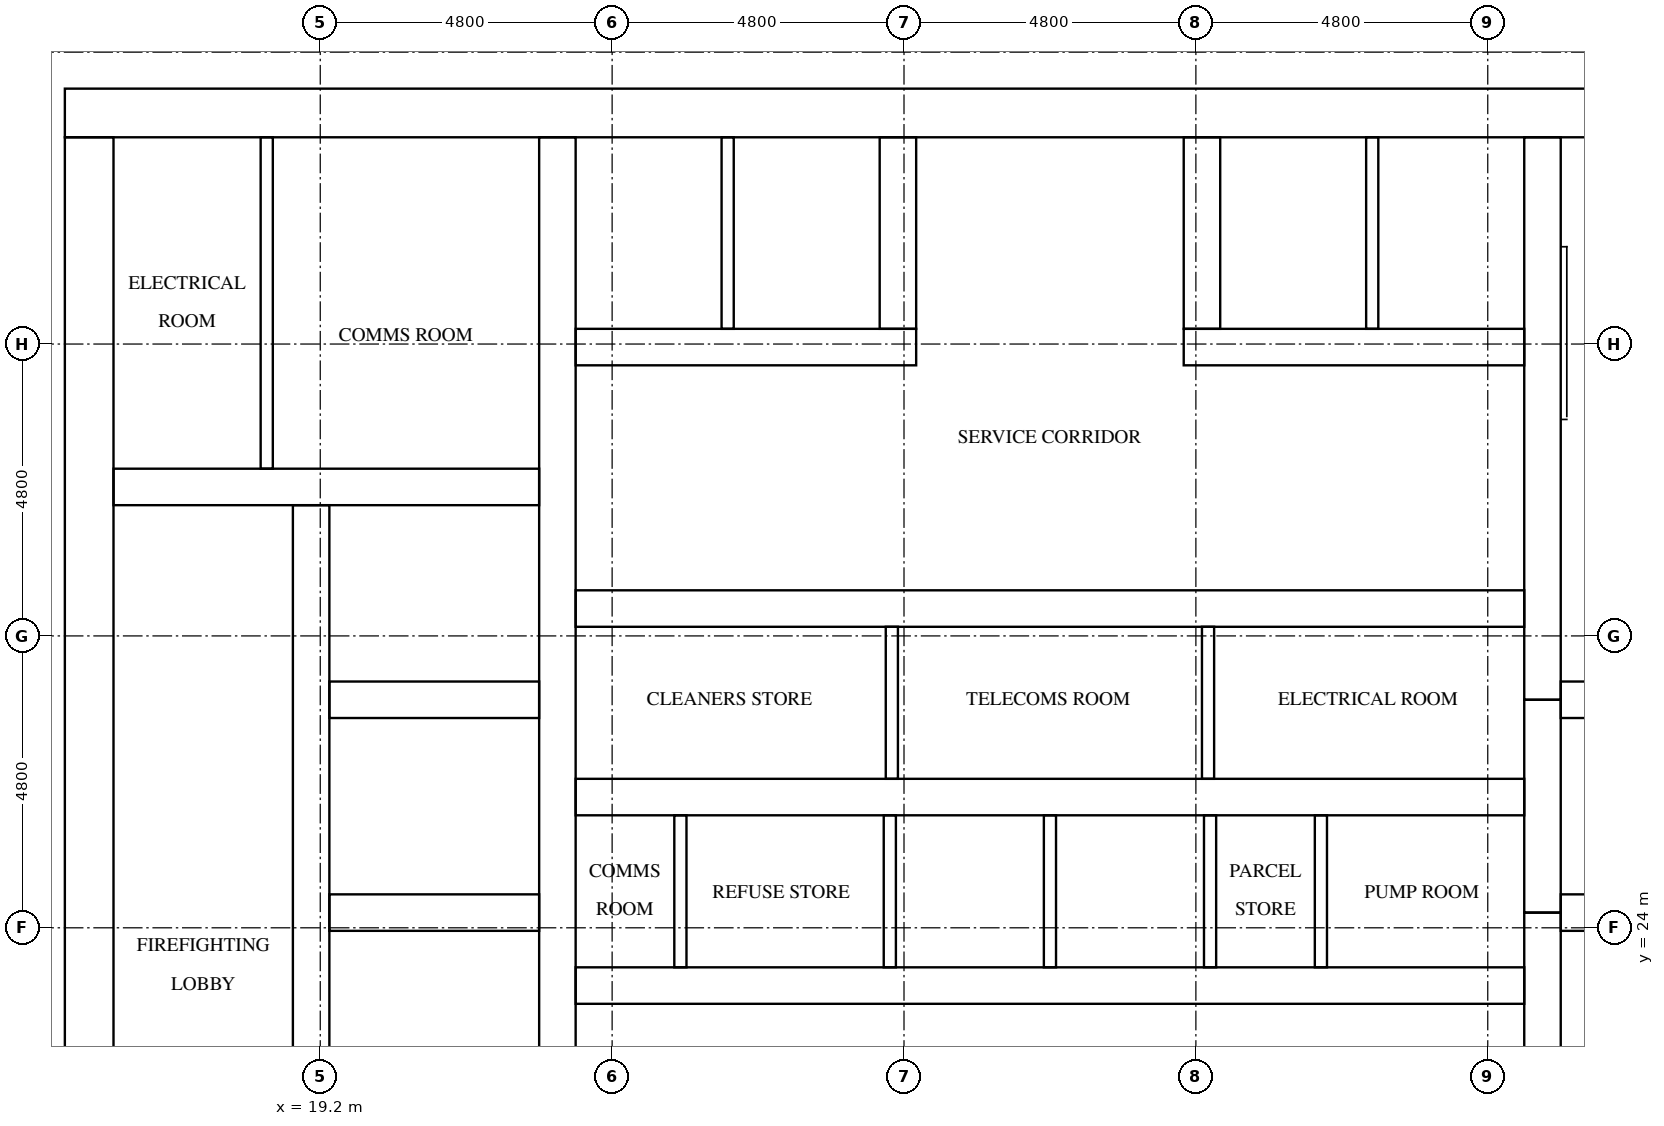
"""IFC4 building model, lengths in metres.
Left out: names, types, materials, properties, quantities, classifications, styles, units other than length and angle.
Written with IfcOpenShell. Run it as: python <this file> out.ifc"""

import sys

from ifc_helpers import new_model, si_unit, direction, frame, frame_2d, origin, place, context, subcontext, project, spatial, rectangle, extrude, element, fill, save


model = new_model("IFC4")
c1 = context("Model", 3, precision=1e-05, world=origin(), true_north=direction((0.0, 1.0)))
c2 = subcontext(c1, "Body", "Model", "MODEL_VIEW")
j1 = project(units=[si_unit("LENGTHUNIT", "METRE"), si_unit("PLANEANGLEUNIT", "RADIAN")], contexts=[c1])
p1 = place(None, origin())
s1 = spatial("IfcSite", under=j1, at=p1, CompositionType="ELEMENT")
p2 = place(p1, origin())
s2 = spatial("IfcBuilding", under=s1, at=p2, CompositionType="ELEMENT")
p3 = place(p2, frame((0.0, 0.0, 122.6)))
s3 = spatial("IfcBuildingStorey", under=s2, at=p3, CompositionType="ELEMENT", Elevation=122.6)
p4 = place(p3, frame((15.0, 37.4, 0.0), z_axis=(0.0, 0.0, 1.0), x_axis=(1.0, 0.0, 0.0)))
e1 = element("IfcWall", 1, at=p4, inside=s3, PredefinedType="SHEAR", context=c2, shape_type="SweptSolid", body=[
    extrude(rectangle(XDim=32.4, YDim=0.8, at=frame_2d((16.2, 0.0))), origin(), (0.0, 0.0, 1.0), 3.2),
])
p5 = place(p4, frame((15.3, 0.0, 0.0)))
e2 = element("IfcOpeningElement", 2, at=p5, cuts=e1, PredefinedType="OPENING", context=c2, shape_type="SweptSolid", body=[
    extrude(rectangle(XDim=1.8, YDim=2.1, at=frame_2d((0.9, 1.05))), frame((0.0, 0.41, 0.0), z_axis=(0.0, -1.0, 0.0), x_axis=(1.0, 0.0, 0.0)), (0.0, 0.0, 1.0), 0.82),
])
p6 = place(p4, frame((1.51, 0.0, 0.0)))
e3 = element("IfcOpeningElement", 3, at=p6, cuts=e1, PredefinedType="OPENING", context=c2, shape_type="SweptSolid", body=[
    extrude(rectangle(XDim=1.0, YDim=2.1, at=frame_2d((0.5, 1.05))), frame((0.0, 0.41, 0.0), z_axis=(0.0, -1.0, 0.0), x_axis=(1.0, 0.0, 0.0)), (0.0, 0.0, 1.0), 0.82),
])
p7 = place(p4, frame((5.11, 0.0, 0.0)))
e4 = element("IfcOpeningElement", 4, at=p7, cuts=e1, PredefinedType="OPENING", context=c2, shape_type="SweptSolid", body=[
    extrude(rectangle(XDim=1.0, YDim=2.1, at=frame_2d((0.5, 1.05))), frame((0.0, 0.41, 0.0), z_axis=(0.0, -1.0, 0.0), x_axis=(1.0, 0.0, 0.0)), (0.0, 0.0, 1.0), 0.82),
])
p8 = place(p3, frame((15.4, 15.8, 0.0), z_axis=(0.0, 0.0, 1.0), x_axis=(0.0, 1.0, 0.0)))
e5 = element("IfcWall", 5, at=p8, inside=s3, PredefinedType="SHEAR", context=c2, shape_type="SweptSolid", body=[
    extrude(rectangle(XDim=21.2, YDim=0.8, at=frame_2d((10.6, 0.0))), origin(), (0.0, 0.0, 1.0), 3.2),
])
p9 = place(p8, frame((4.96, 0.0, 0.0)))
e6 = element("IfcOpeningElement", 6, at=p9, cuts=e5, PredefinedType="OPENING", context=c2, shape_type="SweptSolid", body=[
    extrude(rectangle(XDim=1.2, YDim=2.1, at=frame_2d((0.6, 1.05))), frame((0.0, 0.41, 0.0), z_axis=(0.0, -1.0, 0.0), x_axis=(1.0, 0.0, 0.0)), (0.0, 0.0, 1.0), 0.82),
])
p10 = place(p3, frame((19.05, 15.8, 0.0), z_axis=(0.0, 0.0, 1.0), x_axis=(0.0, 1.0, 0.0)))
e7 = element("IfcWall", 7, at=p10, inside=s3, PredefinedType="SHEAR", context=c2, shape_type="SweptSolid", body=[
    extrude(rectangle(XDim=15.15, YDim=0.6, at=frame_2d((7.575, 0.0))), origin(), (0.0, 0.0, 1.0), 3.2),
])
p11 = place(p10, frame((9.65, 0.0, 0.0)))
e8 = element("IfcOpeningElement", 8, at=p11, cuts=e7, PredefinedType="OPENING", context=c2, shape_type="SweptSolid", body=[
    extrude(rectangle(XDim=1.1, YDim=2.1, at=frame_2d((0.55, 1.05))), frame((0.0, 0.31, 0.0), z_axis=(0.0, -1.0, 0.0), x_axis=(1.0, 0.0, 0.0)), (0.0, 0.0, 1.0), 0.62),
])
p12 = place(p10, frame((13.15, 0.0, 0.0)))
e9 = element("IfcOpeningElement", 9, at=p12, cuts=e7, PredefinedType="OPENING", context=c2, shape_type="SweptSolid", body=[
    extrude(rectangle(XDim=1.1, YDim=2.1, at=frame_2d((0.55, 1.05))), frame((0.0, 0.31, 0.0), z_axis=(0.0, -1.0, 0.0), x_axis=(1.0, 0.0, 0.0)), (0.0, 0.0, 1.0), 0.62),
])
p13 = place(p10, frame((0.4, 0.0, 0.0)))
e10 = element("IfcOpeningElement", 10, at=p13, cuts=e7, PredefinedType="OPENING", context=c2, shape_type="SweptSolid", body=[
    extrude(rectangle(XDim=1.2, YDim=2.1, at=frame_2d((0.6, 1.05))), frame((0.0, 0.31, 0.0), z_axis=(0.0, -1.0, 0.0), x_axis=(1.0, 0.0, 0.0)), (0.0, 0.0, 1.0), 0.62),
])
p14 = place(p3, frame((23.1, 15.8, 0.0), z_axis=(0.0, 0.0, 1.0), x_axis=(0.0, 1.0, 0.0)))
e11 = element("IfcWall", 11, at=p14, inside=s3, PredefinedType="SHEAR", context=c2, shape_type="SweptSolid", body=[
    extrude(rectangle(XDim=21.2, YDim=0.6, at=frame_2d((10.6, 0.0))), origin(), (0.0, 0.0, 1.0), 3.2),
])
p15 = place(p3, frame((39.3, 15.8, 0.0), z_axis=(0.0, 0.0, 1.0), x_axis=(0.0, 1.0, 0.0)))
e12 = element("IfcWall", 12, at=p15, inside=s3, PredefinedType="SHEAR", context=c2, shape_type="SweptSolid", body=[
    extrude(rectangle(XDim=8.45, YDim=0.6, at=frame_2d((4.225, 0.0))), origin(), (0.0, 0.0, 1.0), 3.2),
])
p16 = place(p3, frame((39.3, 24.25, 0.0), z_axis=(0.0, 0.0, 1.0), x_axis=(0.0, 1.0, 0.0)))
e13 = element("IfcWall", 13, at=p16, inside=s3, PredefinedType="SHEAR", context=c2, shape_type="SweptSolid", body=[
    extrude(rectangle(XDim=3.5, YDim=0.6, at=frame_2d((1.75, 0.0))), origin(), (0.0, 0.0, 1.0), 3.2),
])
p17 = place(p3, frame((39.3, 27.75, 0.0), z_axis=(0.0, 0.0, 1.0), x_axis=(0.0, 1.0, 0.0)))
e14 = element("IfcWall", 14, at=p17, inside=s3, PredefinedType="SHEAR", context=c2, shape_type="SweptSolid", body=[
    extrude(rectangle(XDim=9.25, YDim=0.6, at=frame_2d((4.625, 0.0))), origin(), (0.0, 0.0, 1.0), 3.2),
])
for number, where, z_axis, x_axis in (
    (15, (19.35, 24.25, 0.0), (0.0, 0.0, 1.0), (1.0, 0.0, 0.0)),
    (16, (19.35, 27.75, 0.0), (0.0, 0.0, 1.0), (1.0, 0.0, 0.0)),
):
    element("IfcWall", number, at=place(p3, frame(where, z_axis=z_axis, x_axis=x_axis)), inside=s3, PredefinedType="SHEAR", context=c2, shape_type="SweptSolid", body=[
        extrude(rectangle(XDim=3.45, YDim=0.6, at=frame_2d((1.725, 0.0))), origin(), (0.0, 0.0, 1.0), 3.2),
    ])
p18 = place(p3, frame((15.8, 31.25, 0.0), z_axis=(0.0, 0.0, 1.0), x_axis=(1.0, 0.0, 0.0)))
e17 = element("IfcWall", 17, at=p18, inside=s3, PredefinedType="SHEAR", context=c2, shape_type="SweptSolid", body=[
    extrude(rectangle(XDim=7.0, YDim=0.6, at=frame_2d((3.5, 0.0))), origin(), (0.0, 0.0, 1.0), 3.2),
])
for number, where, z_axis, x_axis in (
    (18, (39.6, 24.25, 0.0), (0.0, 0.0, 1.0), (1.0, 0.0, 0.0)),
    (19, (39.6, 27.75, 0.0), (0.0, 0.0, 1.0), (1.0, 0.0, 0.0)),
):
    element("IfcWall", number, at=place(p3, frame(where, z_axis=z_axis, x_axis=x_axis)), inside=s3, PredefinedType="SHEAR", context=c2, shape_type="SweptSolid", body=[
        extrude(rectangle(XDim=3.45, YDim=0.6, at=frame_2d((1.725, 0.0))), origin(), (0.0, 0.0, 1.0), 3.2),
    ])
p19 = place(p3, frame((23.4, 23.05, 0.0), z_axis=(0.0, 0.0, 1.0), x_axis=(1.0, 0.0, 0.0)))
e20 = element("IfcWall", 20, at=p19, inside=s3, PredefinedType="SHEAR", context=c2, shape_type="SweptSolid", body=[
    extrude(rectangle(XDim=15.6, YDim=0.6, at=frame_2d((7.8, 0.0))), origin(), (0.0, 0.0, 1.0), 3.2),
])
p20 = place(p19, frame((0.311, 0.0, 0.0)))
e21 = element("IfcOpeningElement", 21, at=p20, cuts=e20, PredefinedType="OPENING", context=c2, shape_type="SweptSolid", body=[
    extrude(rectangle(XDim=1.0, YDim=2.1, at=frame_2d((0.5, 1.05))), frame((0.0, 0.31, 0.0), z_axis=(0.0, -1.0, 0.0), x_axis=(1.0, 0.0, 0.0)), (0.0, 0.0, 1.0), 0.62),
])
p21 = place(p19, frame((2.945, 0.0, 0.0)))
e22 = element("IfcOpeningElement", 22, at=p21, cuts=e20, PredefinedType="OPENING", context=c2, shape_type="SweptSolid", body=[
    extrude(rectangle(XDim=1.0, YDim=2.1, at=frame_2d((0.5, 1.05))), frame((0.0, 0.31, 0.0), z_axis=(0.0, -1.0, 0.0), x_axis=(1.0, 0.0, 0.0)), (0.0, 0.0, 1.0), 0.62),
])
p22 = place(p19, frame((10.845, 0.0, 0.0)))
e23 = element("IfcOpeningElement", 23, at=p22, cuts=e20, PredefinedType="OPENING", context=c2, shape_type="SweptSolid", body=[
    extrude(rectangle(XDim=1.0, YDim=2.1, at=frame_2d((0.5, 1.05))), frame((0.0, 0.31, 0.0), z_axis=(0.0, -1.0, 0.0), x_axis=(1.0, 0.0, 0.0)), (0.0, 0.0, 1.0), 0.62),
])
p23 = place(p19, frame((13.478, 0.0, 0.0)))
e24 = element("IfcOpeningElement", 24, at=p23, cuts=e20, PredefinedType="OPENING", context=c2, shape_type="SweptSolid", body=[
    extrude(rectangle(XDim=1.0, YDim=2.1, at=frame_2d((0.5, 1.05))), frame((0.0, 0.31, 0.0), z_axis=(0.0, -1.0, 0.0), x_axis=(1.0, 0.0, 0.0)), (0.0, 0.0, 1.0), 0.62),
])
p24 = place(p3, frame((23.4, 26.15, 0.0), z_axis=(0.0, 0.0, 1.0), x_axis=(1.0, 0.0, 0.0)))
e25 = element("IfcWall", 25, at=p24, inside=s3, PredefinedType="SHEAR", context=c2, shape_type="SweptSolid", body=[
    extrude(rectangle(XDim=15.6, YDim=0.6, at=frame_2d((7.8, 0.0))), origin(), (0.0, 0.0, 1.0), 3.2),
])
p25 = place(p3, frame((23.4, 29.25, 0.0), z_axis=(0.0, 0.0, 1.0), x_axis=(1.0, 0.0, 0.0)))
e26 = element("IfcWall", 26, at=p25, inside=s3, PredefinedType="SHEAR", context=c2, shape_type="SweptSolid", body=[
    extrude(rectangle(XDim=15.6, YDim=0.6, at=frame_2d((7.8, 0.0))), origin(), (0.0, 0.0, 1.0), 3.2),
])
p26 = place(p25, frame((2.05, 0.0, 0.0)))
e27 = element("IfcOpeningElement", 27, at=p26, cuts=e26, PredefinedType="OPENING", context=c2, shape_type="SweptSolid", body=[
    extrude(rectangle(XDim=1.0, YDim=2.1, at=frame_2d((0.5, 1.05))), frame((0.0, 0.31, 0.0), z_axis=(0.0, -1.0, 0.0), x_axis=(1.0, 0.0, 0.0)), (0.0, 0.0, 1.0), 0.62),
])
p27 = place(p25, frame((7.3, 0.0, 0.0)))
e28 = element("IfcOpeningElement", 28, at=p27, cuts=e26, PredefinedType="OPENING", context=c2, shape_type="SweptSolid", body=[
    extrude(rectangle(XDim=1.0, YDim=2.1, at=frame_2d((0.5, 1.05))), frame((0.0, 0.31, 0.0), z_axis=(0.0, -1.0, 0.0), x_axis=(1.0, 0.0, 0.0)), (0.0, 0.0, 1.0), 0.62),
])
p28 = place(p25, frame((12.55, 0.0, 0.0)))
e29 = element("IfcOpeningElement", 29, at=p28, cuts=e26, PredefinedType="OPENING", context=c2, shape_type="SweptSolid", body=[
    extrude(rectangle(XDim=1.0, YDim=2.1, at=frame_2d((0.5, 1.05))), frame((0.0, 0.31, 0.0), z_axis=(0.0, -1.0, 0.0), x_axis=(1.0, 0.0, 0.0)), (0.0, 0.0, 1.0), 0.62),
])
for number, where, z_axis, x_axis in (
    (30, (23.4, 33.55, 0.0), (0.0, 0.0, 1.0), (1.0, 0.0, 0.0)),
    (31, (33.4, 33.55, 0.0), (0.0, 0.0, 1.0), (1.0, 0.0, 0.0)),
):
    element("IfcWall", number, at=place(p3, frame(where, z_axis=z_axis, x_axis=x_axis)), inside=s3, PredefinedType="SHEAR", context=c2, shape_type="SweptSolid", body=[
        extrude(rectangle(XDim=5.6, YDim=0.6, at=frame_2d((2.8, 0.0))), origin(), (0.0, 0.0, 1.0), 3.2),
    ])
for number, where, z_axis, x_axis in (
    (32, (28.7, 33.85, 0.0), (0.0, 0.0, 1.0), (0.0, 1.0, 0.0)),
    (33, (33.7, 33.85, 0.0), (0.0, 0.0, 1.0), (0.0, 1.0, 0.0)),
):
    element("IfcWall", number, at=place(p3, frame(where, z_axis=z_axis, x_axis=x_axis)), inside=s3, PredefinedType="SHEAR", context=c2, shape_type="SweptSolid", body=[
        extrude(rectangle(XDim=3.15, YDim=0.6, at=frame_2d((1.575, 0.0))), origin(), (0.0, 0.0, 1.0), 3.2),
    ])
for number, where, z_axis, x_axis in (
    (34, (28.567, 23.35, 0.0), (0.0, 0.0, 1.0), (0.0, 1.0, 0.0)),
    (35, (31.2, 23.35, 0.0), (0.0, 0.0, 1.0), (0.0, 1.0, 0.0)),
    (36, (33.833, 23.35, 0.0), (0.0, 0.0, 1.0), (0.0, 1.0, 0.0)),
):
    element("IfcWall", number, at=place(p3, frame(where, z_axis=z_axis, x_axis=x_axis)), inside=s3, PredefinedType="SOLIDWALL", context=c2, shape_type="SweptSolid", body=[
        extrude(rectangle(XDim=2.5, YDim=0.2, at=frame_2d((1.25, 0.0))), origin(), (0.0, 0.0, 1.0), 3.2),
    ])
for number, where, z_axis, x_axis in (
    (37, (25.9, 33.85, 0.0), (0.0, 0.0, 1.0), (0.0, 1.0, 0.0)),
    (38, (36.5, 33.85, 0.0), (0.0, 0.0, 1.0), (0.0, 1.0, 0.0)),
):
    element("IfcWall", number, at=place(p3, frame(where, z_axis=z_axis, x_axis=x_axis)), inside=s3, PredefinedType="SOLIDWALL", context=c2, shape_type="SweptSolid", body=[
        extrude(rectangle(XDim=3.15, YDim=0.2, at=frame_2d((1.575, 0.0))), origin(), (0.0, 0.0, 1.0), 3.2),
    ])
p29 = place(p3, frame((18.32, 31.55, 0.0), z_axis=(0.0, 0.0, 1.0), x_axis=(0.0, 1.0, 0.0)))
e39 = element("IfcWall", 39, at=p29, inside=s3, PredefinedType="PARTITIONING", context=c2, shape_type="SweptSolid", body=[
    extrude(rectangle(XDim=5.45, YDim=0.2, at=frame_2d((2.725, 0.0))), origin(), (0.0, 0.0, 1.0), 3.2),
])
for number, where, z_axis, x_axis in (
    (40, (25.123, 23.35, 0.0), (0.0, 0.0, 1.0), (0.0, 1.0, 0.0)),
    (41, (35.656, 23.35, 0.0), (0.0, 0.0, 1.0), (0.0, 1.0, 0.0)),
    (42, (28.6, 26.45, 0.0), (0.0, 0.0, 1.0), (0.0, 1.0, 0.0)),
    (43, (33.8, 26.45, 0.0), (0.0, 0.0, 1.0), (0.0, 1.0, 0.0)),
):
    element("IfcWall", number, at=place(p3, frame(where, z_axis=z_axis, x_axis=x_axis)), inside=s3, PredefinedType="PARTITIONING", context=c2, shape_type="SweptSolid", body=[
        extrude(rectangle(XDim=2.5, YDim=0.2, at=frame_2d((1.25, 0.0))), origin(), (0.0, 0.0, 1.0), 3.2),
    ])
p30 = place(p11, origin())
e44 = element("IfcDoor", 44, at=p30, inside=s3, OperationType="DOUBLE_DOOR_SLIDING", PredefinedType="DOOR", context=c2, shape_type="SweptSolid", body=[
    extrude(rectangle(XDim=1.1, YDim=2.1, at=frame_2d((0.55, 1.05))), frame((0.0, 0.025, 0.0), z_axis=(0.0, -1.0, 0.0), x_axis=(1.0, 0.0, 0.0)), (0.0, 0.0, 1.0), 0.05),
])
fill(e8, e44)
p31 = place(p12, origin())
e45 = element("IfcDoor", 45, at=p31, inside=s3, OperationType="DOUBLE_DOOR_SLIDING", PredefinedType="DOOR", context=c2, shape_type="SweptSolid", body=[
    extrude(rectangle(XDim=1.1, YDim=2.1, at=frame_2d((0.55, 1.05))), frame((0.0, 0.025, 0.0), z_axis=(0.0, -1.0, 0.0), x_axis=(1.0, 0.0, 0.0)), (0.0, 0.0, 1.0), 0.05),
])
fill(e9, e45)
p32 = place(p5, origin())
e46 = element("IfcDoor", 46, at=p32, inside=s3, OperationType="DOUBLE_DOOR_SINGLE_SWING", PredefinedType="DOOR", context=c2, shape_type="SweptSolid", body=[
    extrude(rectangle(XDim=1.8, YDim=2.1, at=frame_2d((0.9, 1.05))), frame((0.0, 0.025, 0.0), z_axis=(0.0, -1.0, 0.0), x_axis=(1.0, 0.0, 0.0)), (0.0, 0.0, 1.0), 0.05),
])
fill(e2, e46)
p33 = place(p6, origin())
e47 = element("IfcDoor", 47, at=p33, inside=s3, OperationType="SINGLE_SWING_RIGHT", PredefinedType="DOOR", context=c2, shape_type="SweptSolid", body=[
    extrude(rectangle(XDim=1.0, YDim=2.1, at=frame_2d((0.5, 1.05))), frame((0.0, 0.025, 0.0), z_axis=(0.0, -1.0, 0.0), x_axis=(1.0, 0.0, 0.0)), (0.0, 0.0, 1.0), 0.05),
])
fill(e3, e47)
p34 = place(p7, origin())
e48 = element("IfcDoor", 48, at=p34, inside=s3, OperationType="SINGLE_SWING_LEFT", PredefinedType="DOOR", context=c2, shape_type="SweptSolid", body=[
    extrude(rectangle(XDim=1.0, YDim=2.1, at=frame_2d((0.5, 1.05))), frame((0.0, 0.025, 0.0), z_axis=(0.0, -1.0, 0.0), x_axis=(1.0, 0.0, 0.0)), (0.0, 0.0, 1.0), 0.05),
])
fill(e4, e48)
p35 = place(p20, frame((1.0, 0.0, 0.0), z_axis=(0.0, 0.0, 1.0), x_axis=(-1.0, 0.0, 0.0)))
e49 = element("IfcDoor", 49, at=p35, inside=s3, OperationType="SINGLE_SWING_RIGHT", PredefinedType="DOOR", context=c2, shape_type="SweptSolid", body=[
    extrude(rectangle(XDim=1.0, YDim=2.1, at=frame_2d((0.5, 1.05))), frame((0.0, 0.025, 0.0), z_axis=(0.0, -1.0, 0.0), x_axis=(1.0, 0.0, 0.0)), (0.0, 0.0, 1.0), 0.05),
])
fill(e21, e49)
p36 = place(p21, frame((1.0, 0.0, 0.0), z_axis=(0.0, 0.0, 1.0), x_axis=(-1.0, 0.0, 0.0)))
e50 = element("IfcDoor", 50, at=p36, inside=s3, OperationType="SINGLE_SWING_LEFT", PredefinedType="DOOR", context=c2, shape_type="SweptSolid", body=[
    extrude(rectangle(XDim=1.0, YDim=2.1, at=frame_2d((0.5, 1.05))), frame((0.0, 0.025, 0.0), z_axis=(0.0, -1.0, 0.0), x_axis=(1.0, 0.0, 0.0)), (0.0, 0.0, 1.0), 0.05),
])
fill(e22, e50)
p37 = place(p22, frame((1.0, 0.0, 0.0), z_axis=(0.0, 0.0, 1.0), x_axis=(-1.0, 0.0, 0.0)))
e51 = element("IfcDoor", 51, at=p37, inside=s3, OperationType="SINGLE_SWING_RIGHT", PredefinedType="DOOR", context=c2, shape_type="SweptSolid", body=[
    extrude(rectangle(XDim=1.0, YDim=2.1, at=frame_2d((0.5, 1.05))), frame((0.0, 0.025, 0.0), z_axis=(0.0, -1.0, 0.0), x_axis=(1.0, 0.0, 0.0)), (0.0, 0.0, 1.0), 0.05),
])
fill(e23, e51)
p38 = place(p23, frame((1.0, 0.0, 0.0), z_axis=(0.0, 0.0, 1.0), x_axis=(-1.0, 0.0, 0.0)))
e52 = element("IfcDoor", 52, at=p38, inside=s3, OperationType="SINGLE_SWING_LEFT", PredefinedType="DOOR", context=c2, shape_type="SweptSolid", body=[
    extrude(rectangle(XDim=1.0, YDim=2.1, at=frame_2d((0.5, 1.05))), frame((0.0, 0.025, 0.0), z_axis=(0.0, -1.0, 0.0), x_axis=(1.0, 0.0, 0.0)), (0.0, 0.0, 1.0), 0.05),
])
fill(e24, e52)
p39 = place(p26, origin())
e53 = element("IfcDoor", 53, at=p39, inside=s3, OperationType="SINGLE_SWING_RIGHT", PredefinedType="DOOR", context=c2, shape_type="SweptSolid", body=[
    extrude(rectangle(XDim=1.0, YDim=2.1, at=frame_2d((0.5, 1.05))), frame((0.0, 0.025, 0.0), z_axis=(0.0, -1.0, 0.0), x_axis=(1.0, 0.0, 0.0)), (0.0, 0.0, 1.0), 0.05),
])
fill(e27, e53)
p40 = place(p27, origin())
e54 = element("IfcDoor", 54, at=p40, inside=s3, OperationType="SINGLE_SWING_LEFT", PredefinedType="DOOR", context=c2, shape_type="SweptSolid", body=[
    extrude(rectangle(XDim=1.0, YDim=2.1, at=frame_2d((0.5, 1.05))), frame((0.0, 0.025, 0.0), z_axis=(0.0, -1.0, 0.0), x_axis=(1.0, 0.0, 0.0)), (0.0, 0.0, 1.0), 0.05),
])
fill(e28, e54)
p41 = place(p28, origin())
e55 = element("IfcDoor", 55, at=p41, inside=s3, OperationType="SINGLE_SWING_RIGHT", PredefinedType="DOOR", context=c2, shape_type="SweptSolid", body=[
    extrude(rectangle(XDim=1.0, YDim=2.1, at=frame_2d((0.5, 1.05))), frame((0.0, 0.025, 0.0), z_axis=(0.0, -1.0, 0.0), x_axis=(1.0, 0.0, 0.0)), (0.0, 0.0, 1.0), 0.05),
])
fill(e29, e55)
save(model, sys.argv[1])
